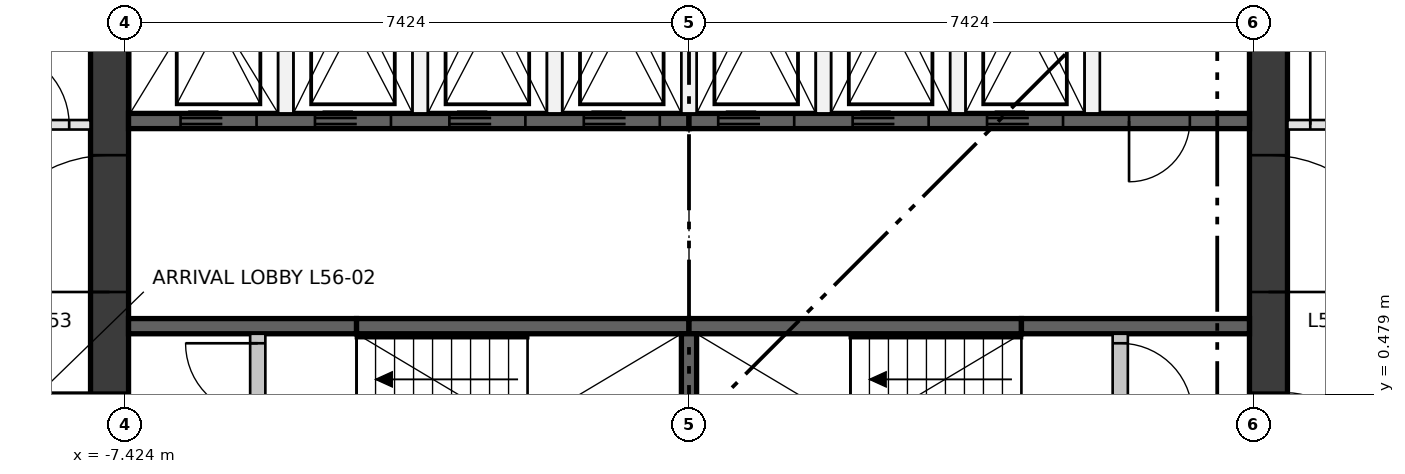
"""IFC4 building model, lengths in metres.
Left out: names, types, materials, properties, quantities, classifications, styles, units other than length and angle.
Written with IfcOpenShell. Run it as: python <this file> out.ifc"""

import sys

from ifc_helpers import new_model, si_unit, direction, frame, frame_2d, origin, place, context, subcontext, project, spatial, rectangle, extrude, element, fill, save


model = new_model("IFC4")
c1 = context("Model", 3, precision=1e-05, world=origin(), true_north=direction((0.0, 1.0)))
c2 = subcontext(c1, "Body", "Model", "MODEL_VIEW")
j1 = project(units=[si_unit("LENGTHUNIT", "METRE"), si_unit("PLANEANGLEUNIT", "RADIAN")], contexts=[c1])
p1 = place(None, origin())
s1 = spatial("IfcSite", under=j1, at=p1, CompositionType="ELEMENT")
p2 = place(p1, origin())
s2 = spatial("IfcBuilding", under=s1, at=p2, CompositionType="ELEMENT")
p3 = place(p2, frame((0.0, 0.0, 207.75)))
s3 = spatial("IfcBuildingStorey", under=s2, at=p3, CompositionType="ELEMENT", Elevation=207.75)
p4 = place(p3, frame((-7.624, -7.374, 0.0), z_axis=(0.0, 0.0, 1.0), x_axis=(0.0, 1.0, 0.0)))
e1 = element("IfcWall", 1, at=p4, inside=s3, PredefinedType="SHEAR", context=c2, shape_type="SweptSolid", body=[
    extrude(rectangle(XDim=14.748, YDim=0.5, at=frame_2d((7.374, 0.0))), origin(), (0.0, 0.0, 1.0), 3.35),
])
p5 = place(p4, frame((6.874, 0.0, 0.0)))
e2 = element("IfcOpeningElement", 2, at=p5, cuts=e1, PredefinedType="OPENING", context=c2, shape_type="SweptSolid", body=[
    extrude(rectangle(XDim=1.0, YDim=2.1, at=frame_2d((0.5, 1.05))), frame((0.0, 0.26, 0.0), z_axis=(0.0, -1.0, 0.0), x_axis=(1.0, 0.0, 0.0)), (0.0, 0.0, 1.0), 0.52),
])
p6 = place(p4, frame((3.75, 0.0, 0.0)))
e3 = element("IfcOpeningElement", 3, at=p6, cuts=e1, PredefinedType="OPENING", context=c2, shape_type="SweptSolid", body=[
    extrude(rectangle(XDim=1.8, YDim=2.1, at=frame_2d((0.9, 1.05))), frame((0.0, 0.26, 0.0), z_axis=(0.0, -1.0, 0.0), x_axis=(1.0, 0.0, 0.0)), (0.0, 0.0, 1.0), 0.52),
])
p7 = place(p4, frame((9.198, 0.0, 0.0)))
e4 = element("IfcOpeningElement", 4, at=p7, cuts=e1, PredefinedType="OPENING", context=c2, shape_type="SweptSolid", body=[
    extrude(rectangle(XDim=1.8, YDim=2.1, at=frame_2d((0.9, 1.05))), frame((0.0, 0.26, 0.0), z_axis=(0.0, -1.0, 0.0), x_axis=(1.0, 0.0, 0.0)), (0.0, 0.0, 1.0), 0.52),
])
p8 = place(p3, frame((7.624, -7.374, 0.0), z_axis=(0.0, 0.0, 1.0), x_axis=(0.0, 1.0, 0.0)))
e5 = element("IfcWall", 5, at=p8, inside=s3, PredefinedType="SHEAR", context=c2, shape_type="SweptSolid", body=[
    extrude(rectangle(XDim=14.748, YDim=0.5, at=frame_2d((7.374, 0.0))), origin(), (0.0, 0.0, 1.0), 3.35),
])
p9 = place(p8, frame((6.874, 0.0, 0.0)))
e6 = element("IfcOpeningElement", 6, at=p9, cuts=e5, PredefinedType="OPENING", context=c2, shape_type="SweptSolid", body=[
    extrude(rectangle(XDim=1.0, YDim=2.1, at=frame_2d((0.5, 1.05))), frame((0.0, 0.26, 0.0), z_axis=(0.0, -1.0, 0.0), x_axis=(1.0, 0.0, 0.0)), (0.0, 0.0, 1.0), 0.52),
])
p10 = place(p8, frame((3.75, 0.0, 0.0)))
e7 = element("IfcOpeningElement", 7, at=p10, cuts=e5, PredefinedType="OPENING", context=c2, shape_type="SweptSolid", body=[
    extrude(rectangle(XDim=1.8, YDim=2.1, at=frame_2d((0.9, 1.05))), frame((0.0, 0.26, 0.0), z_axis=(0.0, -1.0, 0.0), x_axis=(1.0, 0.0, 0.0)), (0.0, 0.0, 1.0), 0.52),
])
p11 = place(p8, frame((9.198, 0.0, 0.0)))
e8 = element("IfcOpeningElement", 8, at=p11, cuts=e5, PredefinedType="OPENING", context=c2, shape_type="SweptSolid", body=[
    extrude(rectangle(XDim=1.8, YDim=2.1, at=frame_2d((0.9, 1.05))), frame((0.0, 0.26, 0.0), z_axis=(0.0, -1.0, 0.0), x_axis=(1.0, 0.0, 0.0)), (0.0, 0.0, 1.0), 0.52),
])
p12 = place(p3, frame((-7.374, 4.074, 0.0), z_axis=(0.0, 0.0, 1.0), x_axis=(1.0, 0.0, 0.0)))
e9 = element("IfcWall", 9, at=p12, inside=s3, PredefinedType="SHEAR", context=c2, shape_type="SweptSolid", body=[
    extrude(rectangle(XDim=7.374, YDim=0.2, at=frame_2d((3.687, 0.0))), origin(), (0.0, 0.0, 1.0), 3.0),
])
p13 = place(p12, frame((0.684, 0.0, 0.0)))
e10 = element("IfcOpeningElement", 10, at=p13, cuts=e9, PredefinedType="OPENING", context=c2, shape_type="SweptSolid", body=[
    extrude(rectangle(XDim=1.0, YDim=2.1, at=frame_2d((0.5, 1.05))), frame((0.0, 0.11, 0.0), z_axis=(0.0, -1.0, 0.0), x_axis=(1.0, 0.0, 0.0)), (0.0, 0.0, 1.0), 0.22),
])
p14 = place(p12, frame((2.453, 0.0, 0.0)))
e11 = element("IfcOpeningElement", 11, at=p14, cuts=e9, PredefinedType="OPENING", context=c2, shape_type="SweptSolid", body=[
    extrude(rectangle(XDim=1.0, YDim=2.1, at=frame_2d((0.5, 1.05))), frame((0.0, 0.11, 0.0), z_axis=(0.0, -1.0, 0.0), x_axis=(1.0, 0.0, 0.0)), (0.0, 0.0, 1.0), 0.22),
])
p15 = place(p12, frame((4.221, 0.0, 0.0)))
e12 = element("IfcOpeningElement", 12, at=p15, cuts=e9, PredefinedType="OPENING", context=c2, shape_type="SweptSolid", body=[
    extrude(rectangle(XDim=1.0, YDim=2.1, at=frame_2d((0.5, 1.05))), frame((0.0, 0.11, 0.0), z_axis=(0.0, -1.0, 0.0), x_axis=(1.0, 0.0, 0.0)), (0.0, 0.0, 1.0), 0.22),
])
p16 = place(p12, frame((5.99, 0.0, 0.0)))
e13 = element("IfcOpeningElement", 13, at=p16, cuts=e9, PredefinedType="OPENING", context=c2, shape_type="SweptSolid", body=[
    extrude(rectangle(XDim=1.0, YDim=2.1, at=frame_2d((0.5, 1.05))), frame((0.0, 0.11, 0.0), z_axis=(0.0, -1.0, 0.0), x_axis=(1.0, 0.0, 0.0)), (0.0, 0.0, 1.0), 0.22),
])
p17 = place(p3, frame((0.0, 4.074, 0.0), z_axis=(0.0, 0.0, 1.0), x_axis=(1.0, 0.0, 0.0)))
e14 = element("IfcWall", 14, at=p17, inside=s3, PredefinedType="SHEAR", context=c2, shape_type="SweptSolid", body=[
    extrude(rectangle(XDim=7.374, YDim=0.2, at=frame_2d((3.687, 0.0))), origin(), (0.0, 0.0, 1.0), 3.0),
])
p18 = place(p17, frame((0.384, 0.0, 0.0)))
e15 = element("IfcOpeningElement", 15, at=p18, cuts=e14, PredefinedType="OPENING", context=c2, shape_type="SweptSolid", body=[
    extrude(rectangle(XDim=1.0, YDim=2.1, at=frame_2d((0.5, 1.05))), frame((0.0, 0.11, 0.0), z_axis=(0.0, -1.0, 0.0), x_axis=(1.0, 0.0, 0.0)), (0.0, 0.0, 1.0), 0.22),
])
p19 = place(p17, frame((2.153, 0.0, 0.0)))
e16 = element("IfcOpeningElement", 16, at=p19, cuts=e14, PredefinedType="OPENING", context=c2, shape_type="SweptSolid", body=[
    extrude(rectangle(XDim=1.0, YDim=2.1, at=frame_2d((0.5, 1.05))), frame((0.0, 0.11, 0.0), z_axis=(0.0, -1.0, 0.0), x_axis=(1.0, 0.0, 0.0)), (0.0, 0.0, 1.0), 0.22),
])
p20 = place(p17, frame((3.921, 0.0, 0.0)))
e17 = element("IfcOpeningElement", 17, at=p20, cuts=e14, PredefinedType="OPENING", context=c2, shape_type="SweptSolid", body=[
    extrude(rectangle(XDim=1.0, YDim=2.1, at=frame_2d((0.5, 1.05))), frame((0.0, 0.11, 0.0), z_axis=(0.0, -1.0, 0.0), x_axis=(1.0, 0.0, 0.0)), (0.0, 0.0, 1.0), 0.22),
])
p21 = place(p17, frame((5.79, 0.0, 0.0)))
e18 = element("IfcOpeningElement", 18, at=p21, cuts=e14, PredefinedType="OPENING", context=c2, shape_type="SweptSolid", body=[
    extrude(rectangle(XDim=0.8, YDim=2.1, at=frame_2d((0.4, 1.05))), frame((0.0, 0.11, 0.0), z_axis=(0.0, -1.0, 0.0), x_axis=(1.0, 0.0, 0.0)), (0.0, 0.0, 1.0), 0.22),
])
p22 = place(p3, frame((-7.374, 1.375, 0.0), z_axis=(0.0, 0.0, 1.0), x_axis=(1.0, 0.0, 0.0)))
e19 = element("IfcWall", 19, at=p22, inside=s3, PredefinedType="SHEAR", context=c2, shape_type="SweptSolid", body=[
    extrude(rectangle(XDim=3.0, YDim=0.2, at=frame_2d((1.5, 0.0))), origin(), (0.0, 0.0, 1.0), 3.0),
])
for number, where, z_axis, x_axis in (
    (20, (-4.374, 1.375, 0.0), (0.0, 0.0, 1.0), (1.0, 0.0, 0.0)),
    (21, (0.0, 1.375, 0.0), (0.0, 0.0, 1.0), (1.0, 0.0, 0.0)),
):
    element("IfcWall", number, at=place(p3, frame(where, z_axis=z_axis, x_axis=x_axis)), inside=s3, PredefinedType="SHEAR", context=c2, shape_type="SweptSolid", body=[
        extrude(rectangle(XDim=4.374, YDim=0.2, at=frame_2d((2.187, 0.0))), origin(), (0.0, 0.0, 1.0), 3.0),
    ])
p23 = place(p3, frame((4.374, 1.375, 0.0), z_axis=(0.0, 0.0, 1.0), x_axis=(1.0, 0.0, 0.0)))
e22 = element("IfcWall", 22, at=p23, inside=s3, PredefinedType="SHEAR", context=c2, shape_type="SweptSolid", body=[
    extrude(rectangle(XDim=3.0, YDim=0.2, at=frame_2d((1.5, 0.0))), origin(), (0.0, 0.0, 1.0), 3.0),
])
p24 = place(p3, frame((0.0, -1.275, 0.0), z_axis=(0.0, 0.0, 1.0), x_axis=(0.0, 1.0, 0.0)))
e23 = element("IfcWall", 23, at=p24, inside=s3, PredefinedType="SHEAR", context=c2, shape_type="SweptSolid", body=[
    extrude(rectangle(XDim=2.55, YDim=0.2, at=frame_2d((1.275, 0.0))), origin(), (0.0, 0.0, 1.0), 3.0),
])
for number, where, z_axis, x_axis in (
    (24, (-5.305, 4.174, 0.0), (0.0, 0.0, 1.0), (0.0, 1.0, 0.0)),
    (25, (-3.537, 4.174, 0.0), (0.0, 0.0, 1.0), (0.0, 1.0, 0.0)),
    (26, (-1.769, 4.174, 0.0), (0.0, 0.0, 1.0), (0.0, 1.0, 0.0)),
    (27, (0.0, 4.174, 0.0), (0.0, 0.0, 1.0), (0.0, 1.0, 0.0)),
    (28, (1.769, 4.174, 0.0), (0.0, 0.0, 1.0), (0.0, 1.0, 0.0)),
    (29, (3.537, 4.174, 0.0), (0.0, 0.0, 1.0), (0.0, 1.0, 0.0)),
    (30, (5.305, 4.174, 0.0), (0.0, 0.0, 1.0), (0.0, 1.0, 0.0)),
):
    element("IfcWall", number, at=place(p3, frame(where, z_axis=z_axis, x_axis=x_axis)), inside=s3, PredefinedType="PARTITIONING", context=c2, shape_type="SweptSolid", body=[
        extrude(rectangle(XDim=3.2, YDim=0.2, at=frame_2d((1.6, 0.0))), origin(), (0.0, 0.0, 1.0), 3.0),
    ])
p25 = place(p3, frame((-5.674, -1.275, 0.0), z_axis=(0.0, 0.0, 1.0), x_axis=(0.0, 1.0, 0.0)))
e31 = element("IfcWall", 31, at=p25, inside=s3, PredefinedType="PARTITIONING", context=c2, shape_type="SweptSolid", body=[
    extrude(rectangle(XDim=2.55, YDim=0.2, at=frame_2d((1.275, 0.0))), origin(), (0.0, 0.0, 1.0), 3.0),
])
p26 = place(p25, frame((0.125, 0.0, 0.0)))
e32 = element("IfcOpeningElement", 32, at=p26, cuts=e31, PredefinedType="OPENING", context=c2, shape_type="SweptSolid", body=[
    extrude(rectangle(XDim=0.95, YDim=2.1, at=frame_2d((0.475, 1.05))), frame((0.0, 0.11, 0.0), z_axis=(0.0, -1.0, 0.0), x_axis=(1.0, 0.0, 0.0)), (0.0, 0.0, 1.0), 0.22),
])
p27 = place(p25, frame((1.475, 0.0, 0.0)))
e33 = element("IfcOpeningElement", 33, at=p27, cuts=e31, PredefinedType="OPENING", context=c2, shape_type="SweptSolid", body=[
    extrude(rectangle(XDim=0.95, YDim=2.1, at=frame_2d((0.475, 1.05))), frame((0.0, 0.11, 0.0), z_axis=(0.0, -1.0, 0.0), x_axis=(1.0, 0.0, 0.0)), (0.0, 0.0, 1.0), 0.22),
])
p28 = place(p3, frame((5.674, -1.275, 0.0), z_axis=(0.0, 0.0, 1.0), x_axis=(0.0, 1.0, 0.0)))
e34 = element("IfcWall", 34, at=p28, inside=s3, PredefinedType="PARTITIONING", context=c2, shape_type="SweptSolid", body=[
    extrude(rectangle(XDim=2.55, YDim=0.2, at=frame_2d((1.275, 0.0))), origin(), (0.0, 0.0, 1.0), 3.0),
])
p29 = place(p28, frame((0.125, 0.0, 0.0)))
e35 = element("IfcOpeningElement", 35, at=p29, cuts=e34, PredefinedType="OPENING", context=c2, shape_type="SweptSolid", body=[
    extrude(rectangle(XDim=0.95, YDim=2.1, at=frame_2d((0.475, 1.05))), frame((0.0, 0.11, 0.0), z_axis=(0.0, -1.0, 0.0), x_axis=(1.0, 0.0, 0.0)), (0.0, 0.0, 1.0), 0.22),
])
p30 = place(p28, frame((1.475, 0.0, 0.0)))
e36 = element("IfcOpeningElement", 36, at=p30, cuts=e34, PredefinedType="OPENING", context=c2, shape_type="SweptSolid", body=[
    extrude(rectangle(XDim=0.95, YDim=2.1, at=frame_2d((0.475, 1.05))), frame((0.0, 0.11, 0.0), z_axis=(0.0, -1.0, 0.0), x_axis=(1.0, 0.0, 0.0)), (0.0, 0.0, 1.0), 0.22),
])
p31 = place(p3, frame((7.874, 4.024, 0.0), z_axis=(0.0, 0.0, 1.0), x_axis=(1.0, 0.0, 0.0)))
e37 = element("IfcWall", 37, at=p31, inside=s3, PredefinedType="PARTITIONING", context=c2, shape_type="SweptSolid", body=[
    extrude(rectangle(XDim=2.475, YDim=0.125, at=frame_2d((1.238, 0.0))), origin(), (0.0, 0.0, 1.0), 3.0),
])
p32 = place(p31, frame((0.3, 0.0, 0.0)))
e38 = element("IfcOpeningElement", 38, at=p32, cuts=e37, PredefinedType="OPENING", context=c2, shape_type="SweptSolid", body=[
    extrude(rectangle(XDim=1.0, YDim=2.1, at=frame_2d((0.5, 1.05))), frame((0.0, 0.073, 0.0), z_axis=(0.0, -1.0, 0.0), x_axis=(1.0, 0.0, 0.0)), (0.0, 0.0, 1.0), 0.145),
])
p33 = place(p3, frame((-9.436, 4.024, 0.0), z_axis=(0.0, 0.0, 1.0), x_axis=(1.0, 0.0, 0.0)))
e39 = element("IfcWall", 39, at=p33, inside=s3, PredefinedType="PARTITIONING", context=c2, shape_type="SweptSolid", body=[
    extrude(rectangle(XDim=1.562, YDim=0.125, at=frame_2d((0.781, 0.0))), origin(), (0.0, 0.0, 1.0), 3.0),
])
p34 = place(p33, frame((0.281, 0.0, 0.0)))
e40 = element("IfcOpeningElement", 40, at=p34, cuts=e39, PredefinedType="OPENING", context=c2, shape_type="SweptSolid", body=[
    extrude(rectangle(XDim=1.0, YDim=2.1, at=frame_2d((0.5, 1.05))), frame((0.0, 0.073, 0.0), z_axis=(0.0, -1.0, 0.0), x_axis=(1.0, 0.0, 0.0)), (0.0, 0.0, 1.0), 0.145),
])
p35 = place(p13, frame((1.0, 0.0, 0.0), z_axis=(0.0, 0.0, 1.0), x_axis=(-1.0, 0.0, 0.0)))
e41 = element("IfcDoor", 41, at=p35, inside=s3, OperationType="DOUBLE_DOOR_SLIDING", PredefinedType="DOOR", context=c2, shape_type="SweptSolid", body=[
    extrude(rectangle(XDim=1.0, YDim=2.1, at=frame_2d((0.5, 1.05))), frame((0.0, 0.025, 0.0), z_axis=(0.0, -1.0, 0.0), x_axis=(1.0, 0.0, 0.0)), (0.0, 0.0, 1.0), 0.05),
])
fill(e10, e41)
p36 = place(p14, frame((1.0, 0.0, 0.0), z_axis=(0.0, 0.0, 1.0), x_axis=(-1.0, 0.0, 0.0)))
e42 = element("IfcDoor", 42, at=p36, inside=s3, OperationType="DOUBLE_DOOR_SLIDING", PredefinedType="DOOR", context=c2, shape_type="SweptSolid", body=[
    extrude(rectangle(XDim=1.0, YDim=2.1, at=frame_2d((0.5, 1.05))), frame((0.0, 0.025, 0.0), z_axis=(0.0, -1.0, 0.0), x_axis=(1.0, 0.0, 0.0)), (0.0, 0.0, 1.0), 0.05),
])
fill(e11, e42)
p37 = place(p15, frame((1.0, 0.0, 0.0), z_axis=(0.0, 0.0, 1.0), x_axis=(-1.0, 0.0, 0.0)))
e43 = element("IfcDoor", 43, at=p37, inside=s3, OperationType="DOUBLE_DOOR_SLIDING", PredefinedType="DOOR", context=c2, shape_type="SweptSolid", body=[
    extrude(rectangle(XDim=1.0, YDim=2.1, at=frame_2d((0.5, 1.05))), frame((0.0, 0.025, 0.0), z_axis=(0.0, -1.0, 0.0), x_axis=(1.0, 0.0, 0.0)), (0.0, 0.0, 1.0), 0.05),
])
fill(e12, e43)
p38 = place(p16, frame((1.0, 0.0, 0.0), z_axis=(0.0, 0.0, 1.0), x_axis=(-1.0, 0.0, 0.0)))
e44 = element("IfcDoor", 44, at=p38, inside=s3, OperationType="DOUBLE_DOOR_SLIDING", PredefinedType="DOOR", context=c2, shape_type="SweptSolid", body=[
    extrude(rectangle(XDim=1.0, YDim=2.1, at=frame_2d((0.5, 1.05))), frame((0.0, 0.025, 0.0), z_axis=(0.0, -1.0, 0.0), x_axis=(1.0, 0.0, 0.0)), (0.0, 0.0, 1.0), 0.05),
])
fill(e13, e44)
p39 = place(p18, frame((1.0, 0.0, 0.0), z_axis=(0.0, 0.0, 1.0), x_axis=(-1.0, 0.0, 0.0)))
e45 = element("IfcDoor", 45, at=p39, inside=s3, OperationType="DOUBLE_DOOR_SLIDING", PredefinedType="DOOR", context=c2, shape_type="SweptSolid", body=[
    extrude(rectangle(XDim=1.0, YDim=2.1, at=frame_2d((0.5, 1.05))), frame((0.0, 0.025, 0.0), z_axis=(0.0, -1.0, 0.0), x_axis=(1.0, 0.0, 0.0)), (0.0, 0.0, 1.0), 0.05),
])
fill(e15, e45)
p40 = place(p19, frame((1.0, 0.0, 0.0), z_axis=(0.0, 0.0, 1.0), x_axis=(-1.0, 0.0, 0.0)))
e46 = element("IfcDoor", 46, at=p40, inside=s3, OperationType="DOUBLE_DOOR_SLIDING", PredefinedType="DOOR", context=c2, shape_type="SweptSolid", body=[
    extrude(rectangle(XDim=1.0, YDim=2.1, at=frame_2d((0.5, 1.05))), frame((0.0, 0.025, 0.0), z_axis=(0.0, -1.0, 0.0), x_axis=(1.0, 0.0, 0.0)), (0.0, 0.0, 1.0), 0.05),
])
fill(e16, e46)
p41 = place(p20, frame((1.0, 0.0, 0.0), z_axis=(0.0, 0.0, 1.0), x_axis=(-1.0, 0.0, 0.0)))
e47 = element("IfcDoor", 47, at=p41, inside=s3, OperationType="DOUBLE_DOOR_SLIDING", PredefinedType="DOOR", context=c2, shape_type="SweptSolid", body=[
    extrude(rectangle(XDim=1.0, YDim=2.1, at=frame_2d((0.5, 1.05))), frame((0.0, 0.025, 0.0), z_axis=(0.0, -1.0, 0.0), x_axis=(1.0, 0.0, 0.0)), (0.0, 0.0, 1.0), 0.05),
])
fill(e17, e47)
p42 = place(p27, origin())
e48 = element("IfcDoor", 48, at=p42, inside=s3, OperationType="SINGLE_SWING_RIGHT", PredefinedType="DOOR", context=c2, shape_type="SweptSolid", body=[
    extrude(rectangle(XDim=0.95, YDim=2.1, at=frame_2d((0.475, 1.05))), frame((0.0, 0.025, 0.0), z_axis=(0.0, -1.0, 0.0), x_axis=(1.0, 0.0, 0.0)), (0.0, 0.0, 1.0), 0.05),
])
fill(e33, e48)
p43 = place(p30, frame((0.95, 0.0, 0.0), z_axis=(0.0, 0.0, 1.0), x_axis=(-1.0, 0.0, 0.0)))
e49 = element("IfcDoor", 49, at=p43, inside=s3, OperationType="SINGLE_SWING_LEFT", PredefinedType="DOOR", context=c2, shape_type="SweptSolid", body=[
    extrude(rectangle(XDim=0.95, YDim=2.1, at=frame_2d((0.475, 1.05))), frame((0.0, 0.025, 0.0), z_axis=(0.0, -1.0, 0.0), x_axis=(1.0, 0.0, 0.0)), (0.0, 0.0, 1.0), 0.05),
])
fill(e36, e49)
p44 = place(p21, frame((0.8, 0.0, 0.0), z_axis=(0.0, 0.0, 1.0), x_axis=(-1.0, 0.0, 0.0)))
e50 = element("IfcDoor", 50, at=p44, inside=s3, OperationType="SINGLE_SWING_LEFT", PredefinedType="DOOR", context=c2, shape_type="SweptSolid", body=[
    extrude(rectangle(XDim=0.8, YDim=2.1, at=frame_2d((0.4, 1.05))), frame((0.0, 0.025, 0.0), z_axis=(0.0, -1.0, 0.0), x_axis=(1.0, 0.0, 0.0)), (0.0, 0.0, 1.0), 0.05),
])
fill(e18, e50)
p45 = place(p5, origin())
e51 = element("IfcDoor", 51, at=p45, inside=s3, OperationType="SINGLE_SWING_RIGHT", PredefinedType="DOOR", context=c2, shape_type="SweptSolid", body=[
    extrude(rectangle(XDim=1.0, YDim=2.1, at=frame_2d((0.5, 1.05))), frame((0.0, 0.25, 0.0), z_axis=(0.0, -1.0, 0.0), x_axis=(1.0, 0.0, 0.0)), (0.0, 0.0, 1.0), 0.05),
])
fill(e2, e51)
p46 = place(p7, origin())
e52 = element("IfcDoor", 52, at=p46, inside=s3, OperationType="DOUBLE_DOOR_SINGLE_SWING", PredefinedType="DOOR", context=c2, shape_type="SweptSolid", body=[
    extrude(rectangle(XDim=1.8, YDim=2.1, at=frame_2d((0.9, 1.05))), frame((0.0, 0.025, 0.0), z_axis=(0.0, -1.0, 0.0), x_axis=(1.0, 0.0, 0.0)), (0.0, 0.0, 1.0), 0.05),
])
fill(e4, e52)
p47 = place(p9, frame((1.0, 0.0, 0.0), z_axis=(0.0, 0.0, 1.0), x_axis=(-1.0, 0.0, 0.0)))
e53 = element("IfcDoor", 53, at=p47, inside=s3, OperationType="SINGLE_SWING_LEFT", PredefinedType="DOOR", context=c2, shape_type="SweptSolid", body=[
    extrude(rectangle(XDim=1.0, YDim=2.1, at=frame_2d((0.5, 1.05))), frame((0.0, 0.25, 0.0), z_axis=(0.0, -1.0, 0.0), x_axis=(1.0, 0.0, 0.0)), (0.0, 0.0, 1.0), 0.05),
])
fill(e6, e53)
p48 = place(p11, frame((1.8, 0.0, 0.0), z_axis=(0.0, 0.0, 1.0), x_axis=(-1.0, 0.0, 0.0)))
e54 = element("IfcDoor", 54, at=p48, inside=s3, OperationType="DOUBLE_DOOR_SINGLE_SWING", PredefinedType="DOOR", context=c2, shape_type="SweptSolid", body=[
    extrude(rectangle(XDim=1.8, YDim=2.1, at=frame_2d((0.9, 1.05))), frame((0.0, 0.025, 0.0), z_axis=(0.0, -1.0, 0.0), x_axis=(1.0, 0.0, 0.0)), (0.0, 0.0, 1.0), 0.05),
])
fill(e8, e54)
p49 = place(p32, origin())
e55 = element("IfcDoor", 55, at=p49, inside=s3, OperationType="SINGLE_SWING_LEFT", PredefinedType="DOOR", context=c2, shape_type="SweptSolid", body=[
    extrude(rectangle(XDim=1.0, YDim=2.1, at=frame_2d((0.5, 1.05))), frame((0.0, 0.025, 0.0), z_axis=(0.0, -1.0, 0.0), x_axis=(1.0, 0.0, 0.0)), (0.0, 0.0, 1.0), 0.05),
])
fill(e38, e55)
p50 = place(p34, origin())
e56 = element("IfcDoor", 56, at=p50, inside=s3, OperationType="SINGLE_SWING_LEFT", PredefinedType="DOOR", context=c2, shape_type="SweptSolid", body=[
    extrude(rectangle(XDim=1.0, YDim=2.1, at=frame_2d((0.5, 1.05))), frame((0.0, 0.025, 0.0), z_axis=(0.0, -1.0, 0.0), x_axis=(1.0, 0.0, 0.0)), (0.0, 0.0, 1.0), 0.05),
])
fill(e40, e56)
save(model, sys.argv[1])
